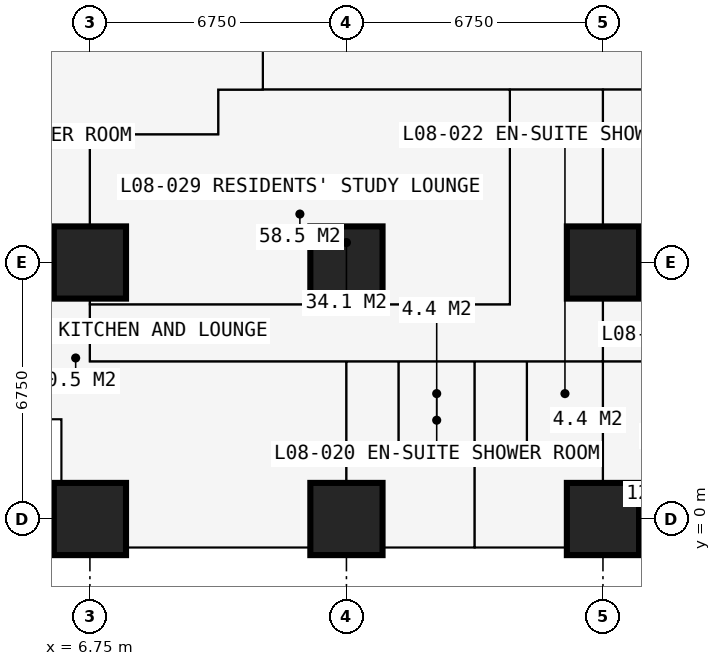
"""IFC4 building model, lengths in metres.
Left out: names, types, materials, properties, quantities, classifications, styles, units other than length and angle.
Written with IfcOpenShell. Run it as: python <this file> out.ifc"""

import sys

from ifc_helpers import new_model, si_unit, direction, frame, frame_2d, origin, origin_2d, place, context, subcontext, project, spatial, rectangle, extrude, element, fill, save


model = new_model("IFC4")
c1 = context("Model", 3, precision=1e-05, world=origin(), true_north=direction((0.0, 1.0)))
c2 = subcontext(c1, "Body", "Model", "MODEL_VIEW")
j1 = project(units=[si_unit("LENGTHUNIT", "METRE"), si_unit("PLANEANGLEUNIT", "RADIAN")], contexts=[c1])
p1 = place(None, origin())
s1 = spatial("IfcSite", under=j1, at=p1, CompositionType="ELEMENT")
p2 = place(p1, origin())
s2 = spatial("IfcBuilding", under=s1, at=p2, CompositionType="ELEMENT")
p3 = place(p2, frame((0.0, 0.0, 32.4)))
s3 = spatial("IfcBuildingStorey", under=s2, at=p3, CompositionType="ELEMENT", Elevation=32.4)
for number, where, z_axis, x_axis in (
    (1, (6.75, 0.0, 0.0), (0.0, 0.0, 1.0), (1.0, 0.0, 0.0)),
    (2, (6.75, 6.75, 0.0), (0.0, 0.0, 1.0), (1.0, 0.0, 0.0)),
    (3, (13.5, 0.0, 0.0), (0.0, 0.0, 1.0), (1.0, 0.0, 0.0)),
    (4, (13.5, 6.75, 0.0), (0.0, 0.0, 1.0), (1.0, 0.0, 0.0)),
    (5, (20.25, 0.0, 0.0), (0.0, 0.0, 1.0), (1.0, 0.0, 0.0)),
    (6, (20.25, 6.75, 0.0), (0.0, 0.0, 1.0), (1.0, 0.0, 0.0)),
):
    element("IfcColumn", number, at=place(p3, frame(where, z_axis=z_axis, x_axis=x_axis)), inside=s3, PredefinedType="COLUMN", context=c2, shape_type="SweptSolid", body=[
        extrude(rectangle(XDim=1.9, YDim=1.9, at=origin_2d()), origin(), (0.0, 0.0, 1.0), 3.6),
    ])
p4 = place(p3, frame((2.625, 2.625, 0.0), z_axis=(0.0, 0.0, 1.0), x_axis=(1.0, 0.0, 0.0)))
e7 = element("IfcWall", 7, at=p4, inside=s3, PredefinedType="SOLIDWALL", context=c2, shape_type="SweptSolid", body=[
    extrude(rectangle(XDim=3.375, YDim=0.3, at=frame_2d((1.688, 0.0))), origin(), (0.0, 0.0, 1.0), 3.375),
])
p5 = place(p4, frame((0.788, 0.0, 0.6)))
e8 = element("IfcOpeningElement", 8, at=p5, cuts=e7, PredefinedType="OPENING", context=c2, shape_type="SweptSolid", body=[
    extrude(rectangle(XDim=1.8, YDim=2.1, at=frame_2d((0.9, 1.05))), frame((0.0, 0.16, 0.0), z_axis=(0.0, -1.0, 0.0), x_axis=(1.0, 0.0, 0.0)), (0.0, 0.0, 1.0), 0.32),
])
p6 = place(p3, frame((6.0, 2.625, 0.0), z_axis=(0.0, 0.0, 1.0), x_axis=(0.0, -1.0, 0.0)))
e9 = element("IfcWall", 9, at=p6, inside=s3, PredefinedType="SOLIDWALL", context=c2, shape_type="SweptSolid", body=[
    extrude(rectangle(XDim=3.375, YDim=0.3, at=frame_2d((1.688, 0.0))), origin(), (0.0, 0.0, 1.0), 3.375),
])
p7 = place(p6, frame((0.317, 0.0, 0.9)))
e10 = element("IfcOpeningElement", 10, at=p7, cuts=e9, PredefinedType="OPENING", context=c2, shape_type="SweptSolid", body=[
    extrude(rectangle(XDim=1.2, YDim=1.8, at=frame_2d((0.6, 0.9))), frame((0.0, 0.16, 0.0), z_axis=(0.0, -1.0, 0.0), x_axis=(1.0, 0.0, 0.0)), (0.0, 0.0, 1.0), 0.32),
])
p8 = place(p3, frame((20.25, -0.75, 0.0), z_axis=(0.0, 0.0, 1.0), x_axis=(-1.0, 0.0, 0.0)))
e11 = element("IfcWall", 11, at=p8, inside=s3, PredefinedType="SOLIDWALL", context=c2, shape_type="SweptSolid", body=[
    extrude(rectangle(XDim=6.75, YDim=0.15, at=frame_2d((3.375, 0.0))), origin(), (0.0, 0.0, 1.0), 3.375),
])
p9 = place(p8, frame((0.996, 0.0, 0.0)))
e12 = element("IfcOpeningElement", 12, at=p9, cuts=e11, PredefinedType="OPENING", context=c2, shape_type="SweptSolid", body=[
    extrude(rectangle(XDim=1.0, YDim=2.2, at=frame_2d((0.5, 1.1))), frame((0.0, 0.085, 0.0), z_axis=(0.0, -1.0, 0.0), x_axis=(1.0, 0.0, 0.0)), (0.0, 0.0, 1.0), 0.17),
])
p10 = place(p8, frame((2.042, 0.0, 0.9)))
e13 = element("IfcOpeningElement", 13, at=p10, cuts=e11, PredefinedType="OPENING", context=c2, shape_type="SweptSolid", body=[
    extrude(rectangle(XDim=1.2, YDim=1.8, at=frame_2d((0.6, 0.9))), frame((0.0, 0.085, 0.0), z_axis=(0.0, -1.0, 0.0), x_axis=(1.0, 0.0, 0.0)), (0.0, 0.0, 1.0), 0.17),
])
p11 = place(p8, frame((4.754, 0.0, 0.0)))
e14 = element("IfcOpeningElement", 14, at=p11, cuts=e11, PredefinedType="OPENING", context=c2, shape_type="SweptSolid", body=[
    extrude(rectangle(XDim=1.0, YDim=2.2, at=frame_2d((0.5, 1.1))), frame((0.0, 0.085, 0.0), z_axis=(0.0, -1.0, 0.0), x_axis=(1.0, 0.0, 0.0)), (0.0, 0.0, 1.0), 0.17),
])
p12 = place(p8, frame((3.508, 0.0, 0.9)))
e15 = element("IfcOpeningElement", 15, at=p12, cuts=e11, PredefinedType="OPENING", context=c2, shape_type="SweptSolid", body=[
    extrude(rectangle(XDim=1.2, YDim=1.8, at=frame_2d((0.6, 0.9))), frame((0.0, 0.085, 0.0), z_axis=(0.0, -1.0, 0.0), x_axis=(1.0, 0.0, 0.0)), (0.0, 0.0, 1.0), 0.17),
])
p13 = place(p3, frame((16.875, -0.85, 0.0), z_axis=(0.0, 0.0, 1.0), x_axis=(0.0, -1.0, 0.0)))
e16 = element("IfcWall", 16, at=p13, inside=s3, PredefinedType="USERDEFINED", context=c2, shape_type="SweptSolid", body=[
    extrude(rectangle(XDim=2.2, YDim=1.0, at=frame_2d((1.1, 0.0))), origin(), (0.0, 0.0, 1.0), 0.9),
])
p14 = place(p3, frame((-0.734, 10.125, 0.0), z_axis=(0.0, 0.0, 1.0), x_axis=(1.0, 0.0, 0.0)))
e17 = element("IfcWall", 17, at=p14, inside=s3, PredefinedType="PARTITIONING", context=c2, shape_type="SweptSolid", body=[
    extrude(rectangle(XDim=10.859, YDim=0.15, at=frame_2d((5.429, 0.0))), origin(), (0.0, 0.0, 1.0), 3.375),
])
p15 = place(p3, frame((6.75, 4.15, 0.0), z_axis=(0.0, 0.0, 1.0), x_axis=(0.0, 1.0, 0.0)))
e18 = element("IfcWall", 18, at=p15, inside=s3, PredefinedType="PARTITIONING", context=c2, shape_type="SweptSolid", body=[
    extrude(rectangle(XDim=5.975, YDim=0.15, at=frame_2d((2.988, 0.0))), origin(), (0.0, 0.0, 1.0), 2.877),
])
p16 = place(p3, frame((6.75, 4.15, 0.0), z_axis=(0.0, 0.0, 1.0), x_axis=(1.0, 0.0, 0.0)))
e19 = element("IfcWall", 19, at=p16, inside=s3, PredefinedType="PARTITIONING", context=c2, shape_type="SweptSolid", body=[
    extrude(rectangle(XDim=23.625, YDim=0.1, at=frame_2d((11.812, 0.0))), origin(), (0.0, 0.0, 1.0), 3.375),
])
p17 = place(p16, frame((2.85, 0.0, 0.0)))
e20 = element("IfcOpeningElement", 20, at=p17, cuts=e19, PredefinedType="OPENING", context=c2, shape_type="SweptSolid", body=[
    extrude(rectangle(XDim=1.0, YDim=2.2, at=frame_2d((0.5, 1.1))), frame((0.0, 0.06, 0.0), z_axis=(0.0, -1.0, 0.0), x_axis=(1.0, 0.0, 0.0)), (0.0, 0.0, 1.0), 0.12),
])
p18 = place(p16, frame((6.95, 0.0, 0.0)))
e21 = element("IfcOpeningElement", 21, at=p18, cuts=e19, PredefinedType="OPENING", context=c2, shape_type="SweptSolid", body=[
    extrude(rectangle(XDim=0.95, YDim=2.2, at=frame_2d((0.475, 1.1))), frame((0.0, 0.06, 0.0), z_axis=(0.0, -1.0, 0.0), x_axis=(1.0, 0.0, 0.0)), (0.0, 0.0, 1.0), 0.12),
])
p19 = place(p16, frame((10.375, 0.0, 0.0)))
e22 = element("IfcOpeningElement", 22, at=p19, cuts=e19, PredefinedType="OPENING", context=c2, shape_type="SweptSolid", body=[
    extrude(rectangle(XDim=0.95, YDim=2.2, at=frame_2d((0.475, 1.1))), frame((0.0, 0.06, 0.0), z_axis=(0.0, -1.0, 0.0), x_axis=(1.0, 0.0, 0.0)), (0.0, 0.0, 1.0), 0.12),
])
p20 = place(p16, frame((18.475, 0.0, 0.0)))
e23 = element("IfcOpeningElement", 23, at=p20, cuts=e19, PredefinedType="OPENING", context=c2, shape_type="SweptSolid", body=[
    extrude(rectangle(XDim=0.95, YDim=2.2, at=frame_2d((0.475, 1.1))), frame((0.0, 0.06, 0.0), z_axis=(0.0, -1.0, 0.0), x_axis=(1.0, 0.0, 0.0)), (0.0, 0.0, 1.0), 0.12),
])
p21 = place(p16, frame((13.7, 0.0, 0.0)))
e24 = element("IfcOpeningElement", 24, at=p21, cuts=e19, PredefinedType="OPENING", context=c2, shape_type="SweptSolid", body=[
    extrude(rectangle(XDim=0.95, YDim=2.2, at=frame_2d((0.475, 1.1))), frame((0.0, 0.06, 0.0), z_axis=(0.0, -1.0, 0.0), x_axis=(1.0, 0.0, 0.0)), (0.0, 0.0, 1.0), 0.12),
])
p22 = place(p3, frame((6.75, 5.65, 0.0), z_axis=(0.0, 0.0, 1.0), x_axis=(1.0, 0.0, 0.0)))
e25 = element("IfcWall", 25, at=p22, inside=s3, PredefinedType="PARTITIONING", context=c2, shape_type="SweptSolid", body=[
    extrude(rectangle(XDim=11.05, YDim=0.15, at=frame_2d((5.525, 0.0))), origin(), (0.0, 0.0, 1.0), 3.375),
])
p23 = place(p3, frame((10.125, 10.125, 0.0), z_axis=(0.0, 0.0, 1.0), x_axis=(0.0, 1.0, 0.0)))
e26 = element("IfcWall", 26, at=p23, inside=s3, PredefinedType="PARTITIONING", context=c2, shape_type="SweptSolid", body=[
    extrude(rectangle(XDim=1.175, YDim=0.15, at=frame_2d((0.587, 0.0))), origin(), (0.0, 0.0, 1.0), 3.375),
])
p24 = place(p3, frame((10.125, 11.3, 0.0), z_axis=(0.0, 0.0, 1.0), x_axis=(1.0, 0.0, 0.0)))
e27 = element("IfcWall", 27, at=p24, inside=s3, PredefinedType="PARTITIONING", context=c2, shape_type="SweptSolid", body=[
    extrude(rectangle(XDim=20.675, YDim=0.15, at=frame_2d((10.337, 0.0))), origin(), (0.0, 0.0, 1.0), 3.375),
])
p25 = place(p24, frame((8.375, 0.0, 0.0)))
e28 = element("IfcOpeningElement", 28, at=p25, cuts=e27, PredefinedType="OPENING", context=c2, shape_type="SweptSolid", body=[
    extrude(rectangle(XDim=1.0, YDim=2.2, at=frame_2d((0.5, 1.1))), frame((0.0, 0.085, 0.0), z_axis=(0.0, -1.0, 0.0), x_axis=(1.0, 0.0, 0.0)), (0.0, 0.0, 1.0), 0.17),
])
p26 = place(p24, frame((10.975, 0.0, 0.0)))
e29 = element("IfcOpeningElement", 29, at=p26, cuts=e27, PredefinedType="OPENING", context=c2, shape_type="SweptSolid", body=[
    extrude(rectangle(XDim=1.0, YDim=2.2, at=frame_2d((0.5, 1.1))), frame((0.0, 0.085, 0.0), z_axis=(0.0, -1.0, 0.0), x_axis=(1.0, 0.0, 0.0)), (0.0, 0.0, 1.0), 0.17),
])
p27 = place(p24, frame((3.925, 0.0, 0.0)))
e30 = element("IfcOpeningElement", 30, at=p27, cuts=e27, PredefinedType="OPENING", context=c2, shape_type="SweptSolid", body=[
    extrude(rectangle(XDim=0.95, YDim=2.2, at=frame_2d((0.475, 1.1))), frame((0.0, 0.085, 0.0), z_axis=(0.0, -1.0, 0.0), x_axis=(1.0, 0.0, 0.0)), (0.0, 0.0, 1.0), 0.17),
])
p28 = place(p3, frame((11.3, 11.3, 0.0), z_axis=(0.0, 0.0, 1.0), x_axis=(0.0, 1.0, 0.0)))
e31 = element("IfcWall", 31, at=p28, inside=s3, PredefinedType="PARTITIONING", context=c2, shape_type="SweptSolid", body=[
    extrude(rectangle(XDim=19.075, YDim=0.15, at=frame_2d((9.538, 0.0))), origin(), (0.0, 0.0, 1.0), 3.375),
])
p29 = place(p28, frame((12.875, 0.0, 0.0)))
e32 = element("IfcOpeningElement", 32, at=p29, cuts=e31, PredefinedType="OPENING", context=c2, shape_type="SweptSolid", body=[
    extrude(rectangle(XDim=1.0, YDim=2.2, at=frame_2d((0.5, 1.1))), frame((0.0, 0.085, 0.0), z_axis=(0.0, -1.0, 0.0), x_axis=(1.0, 0.0, 0.0)), (0.0, 0.0, 1.0), 0.17),
])
p30 = place(p28, frame((10.438, 0.0, 0.0)))
e33 = element("IfcOpeningElement", 33, at=p30, cuts=e31, PredefinedType="OPENING", context=c2, shape_type="SweptSolid", body=[
    extrude(rectangle(XDim=1.0, YDim=2.2, at=frame_2d((0.5, 1.1))), frame((0.0, 0.085, 0.0), z_axis=(0.0, -1.0, 0.0), x_axis=(1.0, 0.0, 0.0)), (0.0, 0.0, 1.0), 0.17),
])
p31 = place(p28, frame((15.675, 0.0, 0.0)))
e34 = element("IfcOpeningElement", 34, at=p31, cuts=e31, PredefinedType="OPENING", context=c2, shape_type="SweptSolid", body=[
    extrude(rectangle(XDim=0.95, YDim=2.2, at=frame_2d((0.475, 1.1))), frame((0.0, 0.085, 0.0), z_axis=(0.0, -1.0, 0.0), x_axis=(1.0, 0.0, 0.0)), (0.0, 0.0, 1.0), 0.17),
])
p32 = place(p3, frame((13.5, -0.734, 0.0), z_axis=(0.0, 0.0, 1.0), x_axis=(0.0, 1.0, 0.0)))
e35 = element("IfcWall", 35, at=p32, inside=s3, PredefinedType="PARTITIONING", context=c2, shape_type="SweptSolid", body=[
    extrude(rectangle(XDim=4.884, YDim=0.15, at=frame_2d((2.442, 0.0))), origin(), (0.0, 0.0, 1.0), 2.877),
])
p33 = place(p3, frame((14.875, 1.95, 0.0), z_axis=(0.0, 0.0, 1.0), x_axis=(0.0, 1.0, 0.0)))
e36 = element("IfcWall", 36, at=p33, inside=s3, PredefinedType="PARTITIONING", context=c2, shape_type="SweptSolid", body=[
    extrude(rectangle(XDim=2.2, YDim=0.1, at=frame_2d((1.1, 0.0))), origin(), (0.0, 0.0, 1.0), 3.375),
])
p34 = place(p33, frame((0.65, 0.0, 0.0)))
e37 = element("IfcOpeningElement", 37, at=p34, cuts=e36, PredefinedType="OPENING", context=c2, shape_type="SweptSolid", body=[
    extrude(rectangle(XDim=0.9, YDim=2.2, at=frame_2d((0.45, 1.1))), frame((0.0, 0.06, 0.0), z_axis=(0.0, -1.0, 0.0), x_axis=(1.0, 0.0, 0.0)), (0.0, 0.0, 1.0), 0.12),
])
p35 = place(p3, frame((14.875, 1.95, 0.0), z_axis=(0.0, 0.0, 1.0), x_axis=(1.0, 0.0, 0.0)))
e38 = element("IfcWall", 38, at=p35, inside=s3, PredefinedType="PARTITIONING", context=c2, shape_type="SweptSolid", body=[
    extrude(rectangle(XDim=2.0, YDim=0.1, at=frame_2d((1.0, 0.0))), origin(), (0.0, 0.0, 1.0), 3.375),
])
p36 = place(p3, frame((16.875, -0.734, 0.0), z_axis=(0.0, 0.0, 1.0), x_axis=(0.0, 1.0, 0.0)))
e39 = element("IfcWall", 39, at=p36, inside=s3, PredefinedType="PARTITIONING", context=c2, shape_type="SweptSolid", body=[
    extrude(rectangle(XDim=4.884, YDim=0.175, at=frame_2d((2.442, 0.0))), origin(), (0.0, 0.0, 1.0), 3.375),
])
p37 = place(p3, frame((17.8, 5.65, 0.0), z_axis=(0.0, 0.0, 1.0), x_axis=(0.0, 1.0, 0.0)))
e40 = element("IfcWall", 40, at=p37, inside=s3, PredefinedType="PARTITIONING", context=c2, shape_type="SweptSolid", body=[
    extrude(rectangle(XDim=5.65, YDim=0.15, at=frame_2d((2.825, 0.0))), origin(), (0.0, 0.0, 1.0), 3.375),
])
p38 = place(p3, frame((18.25, 1.95, 0.0), z_axis=(0.0, 0.0, 1.0), x_axis=(0.0, 1.0, 0.0)))
e41 = element("IfcWall", 41, at=p38, inside=s3, PredefinedType="PARTITIONING", context=c2, shape_type="SweptSolid", body=[
    extrude(rectangle(XDim=2.2, YDim=0.1, at=frame_2d((1.1, 0.0))), origin(), (0.0, 0.0, 1.0), 3.375),
])
p39 = place(p38, frame((0.65, 0.0, 0.0)))
e42 = element("IfcOpeningElement", 42, at=p39, cuts=e41, PredefinedType="OPENING", context=c2, shape_type="SweptSolid", body=[
    extrude(rectangle(XDim=0.9, YDim=2.2, at=frame_2d((0.45, 1.1))), frame((0.0, 0.06, 0.0), z_axis=(0.0, -1.0, 0.0), x_axis=(1.0, 0.0, 0.0)), (0.0, 0.0, 1.0), 0.12),
])
p40 = place(p3, frame((18.25, 1.95, 0.0), z_axis=(0.0, 0.0, 1.0), x_axis=(1.0, 0.0, 0.0)))
e43 = element("IfcWall", 43, at=p40, inside=s3, PredefinedType="PARTITIONING", context=c2, shape_type="SweptSolid", body=[
    extrude(rectangle(XDim=2.0, YDim=0.1, at=frame_2d((1.0, 0.0))), origin(), (0.0, 0.0, 1.0), 3.375),
])
p41 = place(p3, frame((20.25, -0.734, 0.0), z_axis=(0.0, 0.0, 1.0), x_axis=(0.0, 1.0, 0.0)))
e44 = element("IfcWall", 44, at=p41, inside=s3, PredefinedType="PARTITIONING", context=c2, shape_type="SweptSolid", body=[
    extrude(rectangle(XDim=12.034, YDim=0.15, at=frame_2d((6.017, 0.0))), origin(), (0.0, 0.0, 1.0), 2.61),
])
p42 = place(p7, origin())
e45 = element("IfcWindow", 45, at=p42, inside=s3, PartitioningType="SINGLE_PANEL", PredefinedType="WINDOW", context=c2, shape_type="SweptSolid", body=[
    extrude(rectangle(XDim=1.2, YDim=1.8, at=frame_2d((0.6, 0.9))), frame((0.0, 0.03, 0.0), z_axis=(0.0, -1.0, 0.0), x_axis=(1.0, 0.0, 0.0)), (0.0, 0.0, 1.0), 0.06),
])
fill(e10, e45)
p43 = place(p9, origin())
e46 = element("IfcDoor", 46, at=p43, inside=s3, OperationType="SINGLE_SWING_LEFT", PredefinedType="DOOR", context=c2, shape_type="SweptSolid", body=[
    extrude(rectangle(XDim=1.0, YDim=2.2, at=frame_2d((0.5, 1.1))), frame((0.0, 0.025, 0.0), z_axis=(0.0, -1.0, 0.0), x_axis=(1.0, 0.0, 0.0)), (0.0, 0.0, 1.0), 0.05),
])
fill(e12, e46)
p44 = place(p10, origin())
e47 = element("IfcWindow", 47, at=p44, inside=s3, PartitioningType="SINGLE_PANEL", PredefinedType="WINDOW", context=c2, shape_type="SweptSolid", body=[
    extrude(rectangle(XDim=1.2, YDim=1.8, at=frame_2d((0.6, 0.9))), frame((0.0, 0.03, 0.0), z_axis=(0.0, -1.0, 0.0), x_axis=(1.0, 0.0, 0.0)), (0.0, 0.0, 1.0), 0.06),
])
fill(e13, e47)
p45 = place(p11, origin())
e48 = element("IfcDoor", 48, at=p45, inside=s3, OperationType="SINGLE_SWING_RIGHT", PredefinedType="DOOR", context=c2, shape_type="SweptSolid", body=[
    extrude(rectangle(XDim=1.0, YDim=2.2, at=frame_2d((0.5, 1.1))), frame((0.0, 0.025, 0.0), z_axis=(0.0, -1.0, 0.0), x_axis=(1.0, 0.0, 0.0)), (0.0, 0.0, 1.0), 0.05),
])
fill(e14, e48)
p46 = place(p12, origin())
e49 = element("IfcWindow", 49, at=p46, inside=s3, PartitioningType="SINGLE_PANEL", PredefinedType="WINDOW", context=c2, shape_type="SweptSolid", body=[
    extrude(rectangle(XDim=1.2, YDim=1.8, at=frame_2d((0.6, 0.9))), frame((0.0, 0.03, 0.0), z_axis=(0.0, -1.0, 0.0), x_axis=(1.0, 0.0, 0.0)), (0.0, 0.0, 1.0), 0.06),
])
fill(e15, e49)
p47 = place(p17, origin())
e50 = element("IfcDoor", 50, at=p47, inside=s3, OperationType="SINGLE_SWING_LEFT", PredefinedType="DOOR", context=c2, shape_type="SweptSolid", body=[
    extrude(rectangle(XDim=1.0, YDim=2.2, at=frame_2d((0.5, 1.1))), frame((0.0, 0.025, 0.0), z_axis=(0.0, -1.0, 0.0), x_axis=(1.0, 0.0, 0.0)), (0.0, 0.0, 1.0), 0.05),
])
fill(e20, e50)
p48 = place(p18, origin())
e51 = element("IfcDoor", 51, at=p48, inside=s3, OperationType="SINGLE_SWING_LEFT", PredefinedType="DOOR", context=c2, shape_type="SweptSolid", body=[
    extrude(rectangle(XDim=0.95, YDim=2.2, at=frame_2d((0.475, 1.1))), frame((0.0, 0.025, 0.0), z_axis=(0.0, -1.0, 0.0), x_axis=(1.0, 0.0, 0.0)), (0.0, 0.0, 1.0), 0.05),
])
fill(e21, e51)
p49 = place(p34, origin())
e52 = element("IfcDoor", 52, at=p49, inside=s3, OperationType="SINGLE_SWING_RIGHT", PredefinedType="DOOR", context=c2, shape_type="SweptSolid", body=[
    extrude(rectangle(XDim=0.9, YDim=2.2, at=frame_2d((0.45, 1.1))), frame((0.0, 0.025, 0.0), z_axis=(0.0, -1.0, 0.0), x_axis=(1.0, 0.0, 0.0)), (0.0, 0.0, 1.0), 0.05),
])
fill(e37, e52)
p50 = place(p19, origin())
e53 = element("IfcDoor", 53, at=p50, inside=s3, OperationType="SINGLE_SWING_LEFT", PredefinedType="DOOR", context=c2, shape_type="SweptSolid", body=[
    extrude(rectangle(XDim=0.95, YDim=2.2, at=frame_2d((0.475, 1.1))), frame((0.0, 0.025, 0.0), z_axis=(0.0, -1.0, 0.0), x_axis=(1.0, 0.0, 0.0)), (0.0, 0.0, 1.0), 0.05),
])
fill(e22, e53)
p51 = place(p39, origin())
e54 = element("IfcDoor", 54, at=p51, inside=s3, OperationType="SINGLE_SWING_RIGHT", PredefinedType="DOOR", context=c2, shape_type="SweptSolid", body=[
    extrude(rectangle(XDim=0.9, YDim=2.2, at=frame_2d((0.45, 1.1))), frame((0.0, 0.025, 0.0), z_axis=(0.0, -1.0, 0.0), x_axis=(1.0, 0.0, 0.0)), (0.0, 0.0, 1.0), 0.05),
])
fill(e42, e54)
p52 = place(p25, origin())
e55 = element("IfcDoor", 55, at=p52, inside=s3, OperationType="SINGLE_SWING_LEFT", PredefinedType="DOOR", context=c2, shape_type="SweptSolid", body=[
    extrude(rectangle(XDim=1.0, YDim=2.2, at=frame_2d((0.5, 1.1))), frame((0.0, 0.025, 0.0), z_axis=(0.0, -1.0, 0.0), x_axis=(1.0, 0.0, 0.0)), (0.0, 0.0, 1.0), 0.05),
])
fill(e28, e55)
p53 = place(p21, origin())
e56 = element("IfcDoor", 56, at=p53, inside=s3, OperationType="SINGLE_SWING_LEFT", PredefinedType="DOOR", context=c2, shape_type="SweptSolid", body=[
    extrude(rectangle(XDim=0.95, YDim=2.2, at=frame_2d((0.475, 1.1))), frame((0.0, 0.025, 0.0), z_axis=(0.0, -1.0, 0.0), x_axis=(1.0, 0.0, 0.0)), (0.0, 0.0, 1.0), 0.05),
])
fill(e24, e56)
p54 = place(p26, origin())
e57 = element("IfcDoor", 57, at=p54, inside=s3, OperationType="SINGLE_SWING_LEFT", PredefinedType="DOOR", context=c2, shape_type="SweptSolid", body=[
    extrude(rectangle(XDim=1.0, YDim=2.2, at=frame_2d((0.5, 1.1))), frame((0.0, 0.025, 0.0), z_axis=(0.0, -1.0, 0.0), x_axis=(1.0, 0.0, 0.0)), (0.0, 0.0, 1.0), 0.05),
])
fill(e29, e57)
p55 = place(p27, origin())
e58 = element("IfcDoor", 58, at=p55, inside=s3, OperationType="SINGLE_SWING_LEFT", PredefinedType="DOOR", context=c2, shape_type="SweptSolid", body=[
    extrude(rectangle(XDim=0.95, YDim=2.2, at=frame_2d((0.475, 1.1))), frame((0.0, 0.025, 0.0), z_axis=(0.0, -1.0, 0.0), x_axis=(1.0, 0.0, 0.0)), (0.0, 0.0, 1.0), 0.05),
])
fill(e30, e58)
save(model, sys.argv[1])
